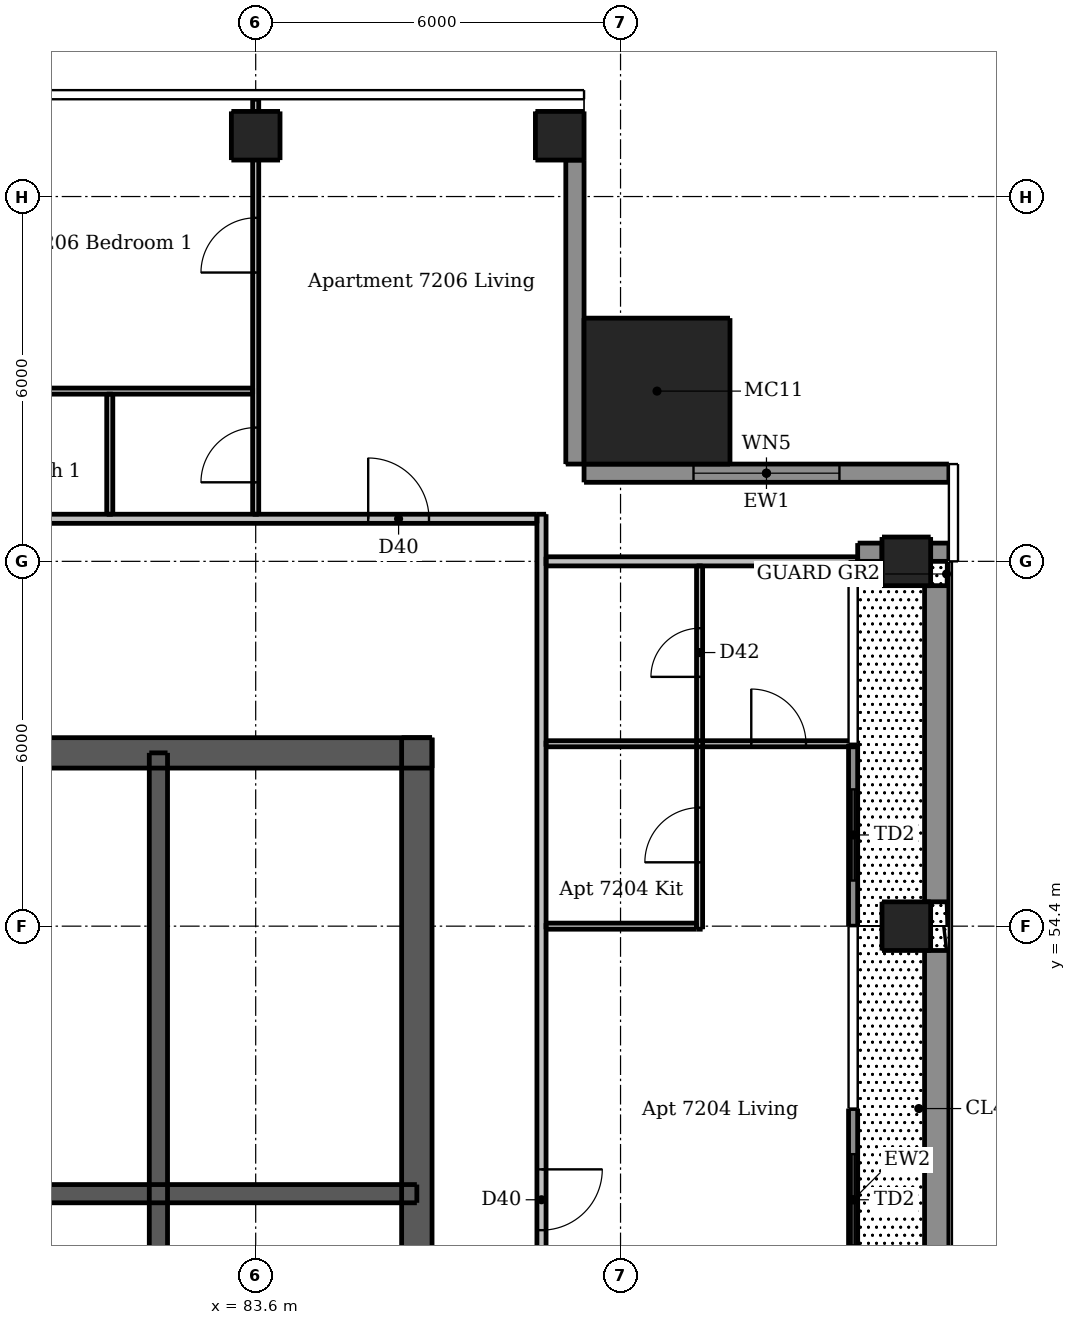
"""IFC4 building model, lengths in metres.
Left out: names, types, materials, properties, quantities, classifications, styles, units other than length and angle.
Written with IfcOpenShell. Run it as: python <this file> out.ifc"""

import sys

from ifc_helpers import new_model, si_unit, direction, frame, frame_2d, origin, origin_2d, place, context, subcontext, project, spatial, rectangle, extrude, element, fill, save


model = new_model("IFC4")
c1 = context("Model", 3, precision=1e-05, world=origin(), true_north=direction((0.0, 1.0)))
c2 = subcontext(c1, "Body", "Model", "MODEL_VIEW")
j1 = project(units=[si_unit("LENGTHUNIT", "METRE"), si_unit("PLANEANGLEUNIT", "RADIAN")], contexts=[c1])
p1 = place(None, origin())
s1 = spatial("IfcSite", under=j1, at=p1, CompositionType="ELEMENT")
p2 = place(p1, origin())
s2 = spatial("IfcBuilding", under=s1, at=p2, CompositionType="ELEMENT")
p3 = place(p2, frame((0.0, 0.0, 268.6)))
s3 = spatial("IfcBuildingStorey", under=s2, at=p3, CompositionType="ELEMENT", Elevation=268.6)
p4 = place(p3, frame((62.5, 57.25, 0.0), z_axis=(0.0, 0.0, 1.0), x_axis=(1.0, 0.0, 0.0)))
e1 = element("IfcWall", 1, at=p4, inside=s3, PredefinedType="SHEAR", context=c2, shape_type="SweptSolid", body=[
    extrude(rectangle(XDim=24.0, YDim=0.5, at=frame_2d((12.0, 0.0))), origin(), (0.0, 0.0, 1.0), 3.05),
])
p5 = place(p4, frame((21.025, 0.0, 0.0)))
e2 = element("IfcOpeningElement", 2, at=p5, cuts=e1, PredefinedType="OPENING", context=c2, shape_type="SweptSolid", body=[
    extrude(rectangle(XDim=1.1, YDim=2.1, at=frame_2d((0.55, 1.05))), frame((0.0, 0.26, 0.0), z_axis=(0.0, -1.0, 0.0), x_axis=(1.0, 0.0, 0.0)), (0.0, 0.0, 1.0), 0.52),
])
p6 = place(p4, frame((1.875, 0.0, 0.0)))
e3 = element("IfcOpeningElement", 3, at=p6, cuts=e1, PredefinedType="OPENING", context=c2, shape_type="SweptSolid", body=[
    extrude(rectangle(XDim=1.1, YDim=2.1, at=frame_2d((0.55, 1.05))), frame((0.0, 0.26, 0.0), z_axis=(0.0, -1.0, 0.0), x_axis=(1.0, 0.0, 0.0)), (0.0, 0.0, 1.0), 0.52),
])
p7 = place(p4, frame((6.405, 0.0, 0.0)))
e4 = element("IfcOpeningElement", 4, at=p7, cuts=e1, PredefinedType="OPENING", context=c2, shape_type="SweptSolid", body=[
    extrude(rectangle(XDim=0.9, YDim=2.1, at=frame_2d((0.45, 1.05))), frame((0.0, 0.26, 0.0), z_axis=(0.0, -1.0, 0.0), x_axis=(1.0, 0.0, 0.0)), (0.0, 0.0, 1.0), 0.52),
])
p8 = place(p4, frame((13.755, 0.0, 0.0)))
e5 = element("IfcOpeningElement", 5, at=p8, cuts=e1, PredefinedType="OPENING", context=c2, shape_type="SweptSolid", body=[
    extrude(rectangle(XDim=0.9, YDim=2.1, at=frame_2d((0.45, 1.05))), frame((0.0, 0.26, 0.0), z_axis=(0.0, -1.0, 0.0), x_axis=(1.0, 0.0, 0.0)), (0.0, 0.0, 1.0), 0.52),
])
p9 = place(p3, frame((86.25, 33.5, 0.0), z_axis=(0.0, 0.0, 1.0), x_axis=(0.0, 1.0, 0.0)))
e6 = element("IfcWall", 6, at=p9, inside=s3, PredefinedType="SHEAR", context=c2, shape_type="SweptSolid", body=[
    extrude(rectangle(XDim=24.0, YDim=0.5, at=frame_2d((12.0, 0.0))), origin(), (0.0, 0.0, 1.0), 3.05),
])
p10 = place(p9, frame((11.2, 0.0, 0.0)))
e7 = element("IfcOpeningElement", 7, at=p10, cuts=e6, PredefinedType="OPENING", context=c2, shape_type="SweptSolid", body=[
    extrude(rectangle(XDim=1.6, YDim=2.1, at=frame_2d((0.8, 1.05))), frame((0.0, 0.26, 0.0), z_axis=(0.0, -1.0, 0.0), x_axis=(1.0, 0.0, 0.0)), (0.0, 0.0, 1.0), 0.52),
])
p11 = place(p3, frame((62.75, 50.0, 0.0), z_axis=(0.0, 0.0, 1.0), x_axis=(1.0, 0.0, 0.0)))
e8 = element("IfcWall", 8, at=p11, inside=s3, PredefinedType="SHEAR", context=c2, shape_type="SweptSolid", body=[
    extrude(rectangle(XDim=23.5, YDim=0.3, at=frame_2d((11.75, 0.0))), origin(), (0.0, 0.0, 1.0), 3.05),
])
p12 = place(p3, frame((82.0, 47.1, 0.0), z_axis=(0.0, 0.0, 1.0), x_axis=(0.0, 1.0, 0.0)))
e9 = element("IfcWall", 9, at=p12, inside=s3, PredefinedType="SHEAR", context=c2, shape_type="SweptSolid", body=[
    extrude(rectangle(XDim=10.15, YDim=0.3, at=frame_2d((5.075, 0.0))), origin(), (0.0, 0.0, 1.0), 3.05),
])
p13 = place(p3, frame((94.3, 54.4, 0.0), z_axis=(0.0, 0.0, 1.0), x_axis=(1.0, 0.0, 0.0)))
e10 = element("IfcColumn", 10, at=p13, inside=s3, PredefinedType="COLUMN", context=c2, shape_type="SweptSolid", body=[
    extrude(rectangle(XDim=0.8, YDim=0.8, at=origin_2d()), origin(), (0.0, 0.0, 1.0), 3.3),
])
for number, where, z_axis, x_axis in (
    (11, (94.3, 60.4, 0.0), (0.0, 0.0, 1.0), (1.0, 0.0, 0.0)),
    (12, (83.6, 67.4, 0.0), (0.0, 0.0, 1.0), (1.0, 0.0, 0.0)),
    (13, (88.6, 67.4, 0.0), (0.0, 0.0, 1.0), (1.0, 0.0, 0.0)),
):
    element("IfcColumn", number, at=place(p3, frame(where, z_axis=z_axis, x_axis=x_axis)), inside=s3, PredefinedType="COLUMN", context=c2, shape_type="SweptSolid", body=[
        extrude(rectangle(XDim=0.8, YDim=0.8, at=origin_2d()), origin(), (0.0, 0.0, 1.0), 3.05),
    ])
p14 = place(p3, frame((90.2, 63.2, 0.0), z_axis=(0.0, 0.0, 1.0), x_axis=(1.0, 0.0, 0.0)))
e14 = element("IfcColumn", 14, at=p14, inside=s3, PredefinedType="COLUMN", context=c2, shape_type="SweptSolid", body=[
    extrude(rectangle(XDim=2.4, YDim=2.4, at=origin_2d()), origin(), (0.0, 0.0, 1.0), 3.3),
])
p15 = place(p3, frame((93.5, 60.55, 0.0), z_axis=(0.0, 0.0, 1.0), x_axis=(1.0, 0.0, 0.0)))
e15 = element("IfcWall", 15, at=p15, inside=s3, PredefinedType="SOLIDWALL", context=c2, shape_type="SweptSolid", body=[
    extrude(rectangle(XDim=0.4, YDim=0.3, at=frame_2d((0.2, 0.0))), origin(), (0.0, 0.0, 1.0), 3.05),
])
p16 = place(p3, frame((94.7, 60.55, 0.0), z_axis=(0.0, 0.0, 1.0), x_axis=(1.0, 0.0, 0.0)))
e16 = element("IfcWall", 16, at=p16, inside=s3, PredefinedType="SOLIDWALL", context=c2, shape_type="SweptSolid", body=[
    extrude(rectangle(XDim=0.3, YDim=0.3, at=frame_2d((0.15, 0.0))), origin(), (0.0, 0.0, 1.0), 3.05),
])
p17 = place(p3, frame((95.0, 61.85, 0.0), z_axis=(0.0, 0.0, 1.0), x_axis=(-1.0, 0.0, 0.0)))
e17 = element("IfcWall", 17, at=p17, inside=s3, PredefinedType="SOLIDWALL", context=c2, shape_type="SweptSolid", body=[
    extrude(rectangle(XDim=6.0, YDim=0.3, at=frame_2d((3.0, 0.0))), origin(), (0.0, 0.0, 1.0), 3.05),
])
p18 = place(p17, frame((1.8, 0.0, 0.15)))
e18 = element("IfcOpeningElement", 18, at=p18, cuts=e17, PredefinedType="OPENING", context=c2, shape_type="SweptSolid", body=[
    extrude(rectangle(XDim=2.4, YDim=2.1, at=frame_2d((1.2, 1.05))), frame((0.0, 0.16, 0.0), z_axis=(0.0, -1.0, 0.0), x_axis=(1.0, 0.0, 0.0)), (0.0, 0.0, 1.0), 0.32),
])
p19 = place(p3, frame((88.85, 62.0, 0.0), z_axis=(0.0, 0.0, 1.0), x_axis=(0.0, 1.0, 0.0)))
e19 = element("IfcWall", 19, at=p19, inside=s3, PredefinedType="SOLIDWALL", context=c2, shape_type="SweptSolid", body=[
    extrude(rectangle(XDim=5.0, YDim=0.3, at=frame_2d((2.5, 0.0))), origin(), (0.0, 0.0, 1.0), 3.05),
])
p20 = place(p3, frame((93.425, 48.4, 0.0), z_axis=(0.0, 0.0, 1.0), x_axis=(0.0, 1.0, 0.0)))
e20 = element("IfcWall", 20, at=p20, inside=s3, PredefinedType="SOLIDWALL", context=c2, shape_type="SweptSolid", body=[
    extrude(rectangle(XDim=3.0, YDim=0.15, at=frame_2d((1.5, 0.0))), origin(), (0.0, 0.0, 1.0), 3.05),
])
p21 = place(p20, frame((0.75, 0.0, 0.0)))
e21 = element("IfcOpeningElement", 21, at=p21, cuts=e20, PredefinedType="OPENING", context=c2, shape_type="SweptSolid", body=[
    extrude(rectangle(XDim=1.5, YDim=2.4, at=frame_2d((0.75, 1.2))), frame((0.0, 0.085, 0.0), z_axis=(0.0, -1.0, 0.0), x_axis=(1.0, 0.0, 0.0)), (0.0, 0.0, 1.0), 0.17),
])
p22 = place(p3, frame((93.425, 54.4, 0.0), z_axis=(0.0, 0.0, 1.0), x_axis=(0.0, 1.0, 0.0)))
e22 = element("IfcWall", 22, at=p22, inside=s3, PredefinedType="SOLIDWALL", context=c2, shape_type="SweptSolid", body=[
    extrude(rectangle(XDim=3.0, YDim=0.15, at=frame_2d((1.5, 0.0))), origin(), (0.0, 0.0, 1.0), 3.05),
])
p23 = place(p22, frame((0.75, 0.0, 0.0)))
e23 = element("IfcOpeningElement", 23, at=p23, cuts=e22, PredefinedType="OPENING", context=c2, shape_type="SweptSolid", body=[
    extrude(rectangle(XDim=1.5, YDim=2.4, at=frame_2d((0.75, 1.2))), frame((0.0, 0.085, 0.0), z_axis=(0.0, -1.0, 0.0), x_axis=(1.0, 0.0, 0.0)), (0.0, 0.0, 1.0), 0.17),
])
for number, where, z_axis, x_axis in (
    (24, (94.8, 48.8, 0.03), (0.0, 0.0, 1.0), (0.0, 1.0, 0.0)),
    (25, (94.8, 54.8, 0.03), (0.0, 0.0, 1.0), (0.0, 1.0, 0.0)),
):
    element("IfcWall", number, at=place(p3, frame(where, z_axis=z_axis, x_axis=x_axis)), inside=s3, PredefinedType="PARAPET", context=c2, shape_type="SweptSolid", body=[
        extrude(rectangle(XDim=5.2, YDim=0.4, at=frame_2d((2.6, 0.0))), origin(), (0.0, 0.0, 1.0), 1.1),
    ])
p24 = place(p3, frame((81.2, 61.175, 0.0), z_axis=(0.0, 0.0, 1.0), x_axis=(0.0, 1.0, 0.0)))
e26 = element("IfcWall", 26, at=p24, inside=s3, PredefinedType="PARTITIONING", context=c2, shape_type="SweptSolid", body=[
    extrude(rectangle(XDim=1.975, YDim=0.1, at=frame_2d((0.987, 0.0))), origin(), (0.0, 0.0, 1.0), 3.05),
])
p25 = place(p3, frame((83.6, 61.175, 0.0), z_axis=(0.0, 0.0, 1.0), x_axis=(0.0, 1.0, 0.0)))
e27 = element("IfcWall", 27, at=p25, inside=s3, PredefinedType="PARTITIONING", context=c2, shape_type="SweptSolid", body=[
    extrude(rectangle(XDim=6.825, YDim=0.1, at=frame_2d((3.413, 0.0))), origin(), (0.0, 0.0, 1.0), 2.516),
])
p26 = place(p25, frame((0.525, 0.0, 0.0)))
e28 = element("IfcOpeningElement", 28, at=p26, cuts=e27, PredefinedType="OPENING", context=c2, shape_type="SweptSolid", body=[
    extrude(rectangle(XDim=0.9, YDim=2.1, at=frame_2d((0.45, 1.05))), frame((0.0, 0.06, 0.0), z_axis=(0.0, -1.0, 0.0), x_axis=(1.0, 0.0, 0.0)), (0.0, 0.0, 1.0), 0.12),
])
p27 = place(p25, frame((3.975, 0.0, 0.0)))
e29 = element("IfcOpeningElement", 29, at=p27, cuts=e27, PredefinedType="OPENING", context=c2, shape_type="SweptSolid", body=[
    extrude(rectangle(XDim=0.9, YDim=2.1, at=frame_2d((0.45, 1.05))), frame((0.0, 0.06, 0.0), z_axis=(0.0, -1.0, 0.0), x_axis=(1.0, 0.0, 0.0)), (0.0, 0.0, 1.0), 0.12),
])
p28 = place(p3, frame((90.9, 54.35, 0.0), z_axis=(0.0, 0.0, 1.0), x_axis=(0.0, 1.0, 0.0)))
e30 = element("IfcWall", 30, at=p28, inside=s3, PredefinedType="PARTITIONING", context=c2, shape_type="SweptSolid", body=[
    extrude(rectangle(XDim=5.975, YDim=0.1, at=frame_2d((2.987, 0.0))), origin(), (0.0, 0.0, 1.0), 3.05),
])
p29 = place(p28, frame((1.1, 0.0, 0.0)))
e31 = element("IfcOpeningElement", 31, at=p29, cuts=e30, PredefinedType="OPENING", context=c2, shape_type="SweptSolid", body=[
    extrude(rectangle(XDim=0.9, YDim=2.1, at=frame_2d((0.45, 1.05))), frame((0.0, 0.06, 0.0), z_axis=(0.0, -1.0, 0.0), x_axis=(1.0, 0.0, 0.0)), (0.0, 0.0, 1.0), 0.12),
])
p30 = place(p28, frame((4.15, 0.0, 0.0)))
e32 = element("IfcOpeningElement", 32, at=p30, cuts=e30, PredefinedType="OPENING", context=c2, shape_type="SweptSolid", body=[
    extrude(rectangle(XDim=0.8, YDim=2.1, at=frame_2d((0.4, 1.05))), frame((0.0, 0.06, 0.0), z_axis=(0.0, -1.0, 0.0), x_axis=(1.0, 0.0, 0.0)), (0.0, 0.0, 1.0), 0.12),
])
p31 = place(p3, frame((83.55, 63.2, 0.0), z_axis=(0.0, 0.0, 1.0), x_axis=(-1.0, 0.0, 0.0)))
e33 = element("IfcWall", 33, at=p31, inside=s3, PredefinedType="PARTITIONING", context=c2, shape_type="SweptSolid", body=[
    extrude(rectangle(XDim=5.875, YDim=0.1, at=frame_2d((2.938, 0.0))), origin(), (0.0, 0.0, 1.0), 3.05),
])
p32 = place(p31, frame((3.75, 0.0, 0.0)))
e34 = element("IfcOpeningElement", 34, at=p32, cuts=e33, PredefinedType="OPENING", context=c2, shape_type="SweptSolid", body=[
    extrude(rectangle(XDim=0.8, YDim=2.1, at=frame_2d((0.4, 1.05))), frame((0.0, 0.06, 0.0), z_axis=(0.0, -1.0, 0.0), x_axis=(1.0, 0.0, 0.0)), (0.0, 0.0, 1.0), 0.12),
])
p33 = place(p3, frame((88.375, 57.4, 0.0), z_axis=(0.0, 0.0, 1.0), x_axis=(1.0, 0.0, 0.0)))
e35 = element("IfcWall", 35, at=p33, inside=s3, PredefinedType="PARTITIONING", context=c2, shape_type="SweptSolid", body=[
    extrude(rectangle(XDim=5.125, YDim=0.1, at=frame_2d((2.562, 0.0))), origin(), (0.0, 0.0, 1.0), 3.05),
])
p34 = place(p33, frame((3.375, 0.0, 0.0)))
e36 = element("IfcOpeningElement", 36, at=p34, cuts=e35, PredefinedType="OPENING", context=c2, shape_type="SweptSolid", body=[
    extrude(rectangle(XDim=0.9, YDim=2.1, at=frame_2d((0.45, 1.05))), frame((0.0, 0.06, 0.0), z_axis=(0.0, -1.0, 0.0), x_axis=(1.0, 0.0, 0.0)), (0.0, 0.0, 1.0), 0.12),
])
p35 = place(p3, frame((88.375, 54.4, 0.0), z_axis=(0.0, 0.0, 1.0), x_axis=(1.0, 0.0, 0.0)))
e37 = element("IfcWall", 37, at=p35, inside=s3, PredefinedType="PARTITIONING", context=c2, shape_type="SweptSolid", body=[
    extrude(rectangle(XDim=2.475, YDim=0.1, at=frame_2d((1.238, 0.0))), origin(), (0.0, 0.0, 1.0), 2.59),
])
p36 = place(p3, frame((88.3, 61.175, 0.0), z_axis=(0.0, 0.0, 1.0), x_axis=(0.0, -1.0, 0.0)))
e38 = element("IfcWall", 38, at=p36, inside=s3, PredefinedType="PARTITIONING", context=c2, shape_type="SweptSolid", body=[
    extrude(rectangle(XDim=29.4, YDim=0.15, at=frame_2d((14.7, 0.0))), origin(), (0.0, 0.0, 1.0), 3.05),
])
p37 = place(p36, frame((28.113, 0.0, 0.0)))
e39 = element("IfcOpeningElement", 39, at=p37, cuts=e38, PredefinedType="OPENING", context=c2, shape_type="SweptSolid", body=[
    extrude(rectangle(XDim=1.0, YDim=2.1, at=frame_2d((0.5, 1.05))), frame((0.0, 0.085, 0.0), z_axis=(0.0, -1.0, 0.0), x_axis=(1.0, 0.0, 0.0)), (0.0, 0.0, 1.0), 0.17),
])
p38 = place(p36, frame((10.775, 0.0, 0.0)))
e40 = element("IfcOpeningElement", 40, at=p38, cuts=e38, PredefinedType="OPENING", context=c2, shape_type="SweptSolid", body=[
    extrude(rectangle(XDim=1.0, YDim=2.1, at=frame_2d((0.5, 1.05))), frame((0.0, 0.085, 0.0), z_axis=(0.0, -1.0, 0.0), x_axis=(1.0, 0.0, 0.0)), (0.0, 0.0, 1.0), 0.17),
])
p39 = place(p3, frame((58.975, 61.1, 0.0), z_axis=(0.0, 0.0, 1.0), x_axis=(1.0, 0.0, 0.0)))
e41 = element("IfcWall", 41, at=p39, inside=s3, PredefinedType="PARTITIONING", context=c2, shape_type="SweptSolid", body=[
    extrude(rectangle(XDim=29.25, YDim=0.15, at=frame_2d((14.625, 0.0))), origin(), (0.0, 0.0, 1.0), 3.05),
])
p40 = place(p39, frame((9.125, 0.0, 0.0)))
e42 = element("IfcOpeningElement", 42, at=p40, cuts=e41, PredefinedType="OPENING", context=c2, shape_type="SweptSolid", body=[
    extrude(rectangle(XDim=1.0, YDim=2.1, at=frame_2d((0.5, 1.05))), frame((0.0, 0.085, 0.0), z_axis=(0.0, -1.0, 0.0), x_axis=(1.0, 0.0, 0.0)), (0.0, 0.0, 1.0), 0.17),
])
p41 = place(p39, frame((26.475, 0.0, 0.0)))
e43 = element("IfcOpeningElement", 43, at=p41, cuts=e41, PredefinedType="OPENING", context=c2, shape_type="SweptSolid", body=[
    extrude(rectangle(XDim=1.0, YDim=2.1, at=frame_2d((0.5, 1.05))), frame((0.0, 0.085, 0.0), z_axis=(0.0, -1.0, 0.0), x_axis=(1.0, 0.0, 0.0)), (0.0, 0.0, 1.0), 0.17),
])
p42 = place(p3, frame((88.375, 60.4, 0.0), z_axis=(0.0, 0.0, 1.0), x_axis=(1.0, 0.0, 0.0)))
e44 = element("IfcWall", 44, at=p42, inside=s3, PredefinedType="PARTITIONING", context=c2, shape_type="SweptSolid", body=[
    extrude(rectangle(XDim=5.125, YDim=0.15, at=frame_2d((2.562, 0.0))), origin(), (0.0, 0.0, 1.0), 2.647),
])
p43 = place(p18, origin())
e45 = element("IfcWindow", 45, at=p43, inside=s3, PartitioningType="DOUBLE_PANEL_VERTICAL", PredefinedType="WINDOW", context=c2, shape_type="SweptSolid", body=[
    extrude(rectangle(XDim=2.4, YDim=2.1, at=frame_2d((1.2, 1.05))), frame((0.0, 0.03, 0.0), z_axis=(0.0, -1.0, 0.0), x_axis=(1.0, 0.0, 0.0)), (0.0, 0.0, 1.0), 0.06),
])
fill(e18, e45)
p44 = place(p21, origin())
e46 = element("IfcDoor", 46, at=p44, inside=s3, OperationType="DOUBLE_DOOR_SLIDING", PredefinedType="DOOR", context=c2, shape_type="SweptSolid", body=[
    extrude(rectangle(XDim=1.5, YDim=2.4, at=frame_2d((0.75, 1.2))), frame((0.0, 0.025, 0.0), z_axis=(0.0, -1.0, 0.0), x_axis=(1.0, 0.0, 0.0)), (0.0, 0.0, 1.0), 0.05),
])
fill(e21, e46)
p45 = place(p23, origin())
e47 = element("IfcDoor", 47, at=p45, inside=s3, OperationType="DOUBLE_DOOR_SLIDING", PredefinedType="DOOR", context=c2, shape_type="SweptSolid", body=[
    extrude(rectangle(XDim=1.5, YDim=2.4, at=frame_2d((0.75, 1.2))), frame((0.0, 0.025, 0.0), z_axis=(0.0, -1.0, 0.0), x_axis=(1.0, 0.0, 0.0)), (0.0, 0.0, 1.0), 0.05),
])
fill(e23, e47)
p46 = place(p5, origin())
e48 = element("IfcDoor", 48, at=p46, inside=s3, OperationType="SINGLE_SWING_RIGHT", PredefinedType="DOOR", context=c2, shape_type="SweptSolid", body=[
    extrude(rectangle(XDim=1.1, YDim=2.1, at=frame_2d((0.55, 1.05))), frame((0.0, -0.188, 0.0), z_axis=(0.0, -1.0, 0.0), x_axis=(1.0, 0.0, 0.0)), (0.0, 0.0, 1.0), 0.05),
])
fill(e2, e48)
p47 = place(p38, origin())
e49 = element("IfcDoor", 49, at=p47, inside=s3, OperationType="SINGLE_SWING_LEFT", PredefinedType="DOOR", context=c2, shape_type="SweptSolid", body=[
    extrude(rectangle(XDim=1.0, YDim=2.1, at=frame_2d((0.5, 1.05))), frame((0.0, 0.025, 0.0), z_axis=(0.0, -1.0, 0.0), x_axis=(1.0, 0.0, 0.0)), (0.0, 0.0, 1.0), 0.05),
])
fill(e40, e49)
p48 = place(p29, origin())
e50 = element("IfcDoor", 50, at=p48, inside=s3, OperationType="SINGLE_SWING_LEFT", PredefinedType="DOOR", context=c2, shape_type="SweptSolid", body=[
    extrude(rectangle(XDim=0.9, YDim=2.1, at=frame_2d((0.45, 1.05))), frame((0.0, 0.025, 0.0), z_axis=(0.0, -1.0, 0.0), x_axis=(1.0, 0.0, 0.0)), (0.0, 0.0, 1.0), 0.05),
])
fill(e31, e50)
p49 = place(p34, origin())
e51 = element("IfcDoor", 51, at=p49, inside=s3, OperationType="SINGLE_SWING_LEFT", PredefinedType="DOOR", context=c2, shape_type="SweptSolid", body=[
    extrude(rectangle(XDim=0.9, YDim=2.1, at=frame_2d((0.45, 1.05))), frame((0.0, 0.025, 0.0), z_axis=(0.0, -1.0, 0.0), x_axis=(1.0, 0.0, 0.0)), (0.0, 0.0, 1.0), 0.05),
])
fill(e36, e51)
p50 = place(p30, origin())
e52 = element("IfcDoor", 52, at=p50, inside=s3, OperationType="SINGLE_SWING_LEFT", PredefinedType="DOOR", context=c2, shape_type="SweptSolid", body=[
    extrude(rectangle(XDim=0.8, YDim=2.1, at=frame_2d((0.4, 1.05))), frame((0.0, 0.025, 0.0), z_axis=(0.0, -1.0, 0.0), x_axis=(1.0, 0.0, 0.0)), (0.0, 0.0, 1.0), 0.05),
])
fill(e32, e52)
p51 = place(p41, origin())
e53 = element("IfcDoor", 53, at=p51, inside=s3, OperationType="SINGLE_SWING_LEFT", PredefinedType="DOOR", context=c2, shape_type="SweptSolid", body=[
    extrude(rectangle(XDim=1.0, YDim=2.1, at=frame_2d((0.5, 1.05))), frame((0.0, 0.025, 0.0), z_axis=(0.0, -1.0, 0.0), x_axis=(1.0, 0.0, 0.0)), (0.0, 0.0, 1.0), 0.05),
])
fill(e43, e53)
p52 = place(p26, origin())
e54 = element("IfcDoor", 54, at=p52, inside=s3, OperationType="SINGLE_SWING_LEFT", PredefinedType="DOOR", context=c2, shape_type="SweptSolid", body=[
    extrude(rectangle(XDim=0.9, YDim=2.1, at=frame_2d((0.45, 1.05))), frame((0.0, 0.025, 0.0), z_axis=(0.0, -1.0, 0.0), x_axis=(1.0, 0.0, 0.0)), (0.0, 0.0, 1.0), 0.05),
])
fill(e28, e54)
p53 = place(p27, origin())
e55 = element("IfcDoor", 55, at=p53, inside=s3, OperationType="SINGLE_SWING_LEFT", PredefinedType="DOOR", context=c2, shape_type="SweptSolid", body=[
    extrude(rectangle(XDim=0.9, YDim=2.1, at=frame_2d((0.45, 1.05))), frame((0.0, 0.025, 0.0), z_axis=(0.0, -1.0, 0.0), x_axis=(1.0, 0.0, 0.0)), (0.0, 0.0, 1.0), 0.05),
])
fill(e29, e55)
save(model, sys.argv[1])
